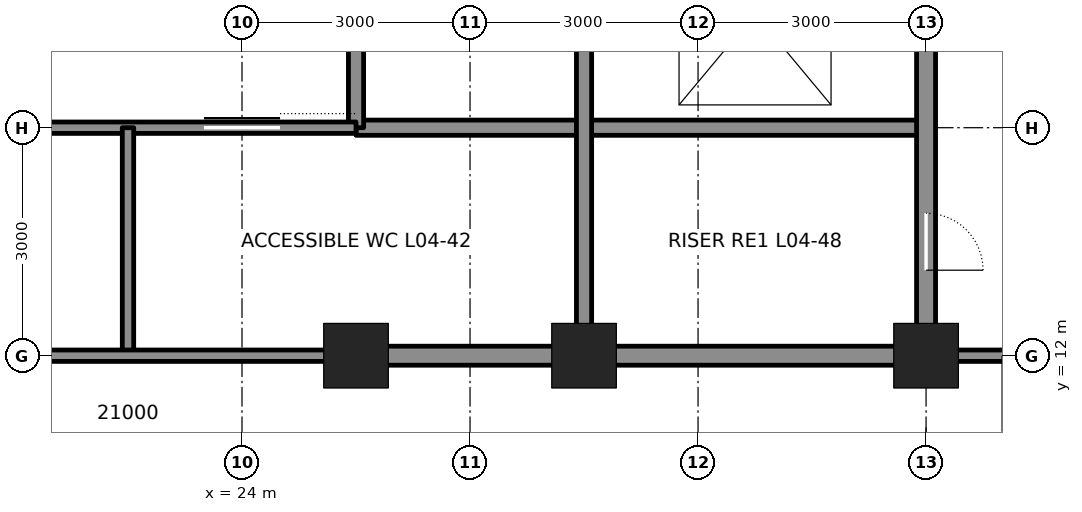
"""IFC4 building model, lengths in metres.
Left out: names, types, materials, properties, quantities, classifications, styles, units other than length and angle.
Written with IfcOpenShell. Run it as: python <this file> out.ifc"""

import sys

from ifc_helpers import new_model, si_unit, direction, frame, frame_2d, origin, origin_2d, place, context, subcontext, project, spatial, rectangle, hollow_rectangle, extrude, element, fill, save


model = new_model("IFC4")
c1 = context("Model", 3, precision=1e-05, world=origin(), true_north=direction((0.0, 1.0)))
c2 = subcontext(c1, "Body", "Model", "MODEL_VIEW")
j1 = project(units=[si_unit("LENGTHUNIT", "METRE"), si_unit("PLANEANGLEUNIT", "RADIAN")], contexts=[c1])
p1 = place(None, origin())
s1 = spatial("IfcSite", under=j1, at=p1, CompositionType="ELEMENT")
p2 = place(p1, origin())
s2 = spatial("IfcBuilding", under=s1, at=p2, CompositionType="ELEMENT")
p3 = place(p2, frame((0.0, 0.0, 24.3)))
s3 = spatial("IfcBuildingStorey", under=s2, at=p3, CompositionType="ELEMENT", Elevation=24.3)
for number, where, z_axis, x_axis in (
    (1, (25.5, 12.0, 0.0), (0.0, 0.0, 1.0), (1.0, 0.0, 0.0)),
    (2, (28.5, 12.0, 0.0), (0.0, 0.0, 1.0), (1.0, 0.0, 0.0)),
    (3, (33.0, 12.0, 0.0), (0.0, 0.0, 1.0), (1.0, 0.0, 0.0)),
):
    element("IfcColumn", number, at=place(p3, frame(where, z_axis=z_axis, x_axis=x_axis)), inside=s3, PredefinedType="COLUMN", context=c2, shape_type="SweptSolid", body=[
        extrude(hollow_rectangle(XDim=0.85, YDim=0.85, WallThickness=0.085, at=origin_2d()), origin(), (0.0, 0.0, 1.0), 4.5),
    ])
p4 = place(p3, frame((25.75, 12.0, 0.0), z_axis=(0.0, 0.0, 1.0), x_axis=(1.0, 0.0, 0.0)))
e4 = element("IfcWall", 4, at=p4, inside=s3, PredefinedType="SOLIDWALL", context=c2, shape_type="SweptSolid", body=[
    extrude(rectangle(XDim=2.5, YDim=0.25, at=frame_2d((1.25, 0.0))), origin(), (0.0, 0.0, 1.0), 3.181),
])
p5 = place(p3, frame((28.75, 12.0, 0.0), z_axis=(0.0, 0.0, 1.0), x_axis=(1.0, 0.0, 0.0)))
e5 = element("IfcWall", 5, at=p5, inside=s3, PredefinedType="SOLIDWALL", context=c2, shape_type="SweptSolid", body=[
    extrude(rectangle(XDim=4.0, YDim=0.25, at=frame_2d((2.0, 0.0))), origin(), (0.0, 0.0, 1.0), 3.181),
])
p6 = place(p3, frame((25.5, 15.0, 0.0), z_axis=(0.0, 0.0, 1.0), x_axis=(1.0, 0.0, 0.0)))
e6 = element("IfcWall", 6, at=p6, inside=s3, PredefinedType="SOLIDWALL", context=c2, shape_type="SweptSolid", body=[
    extrude(rectangle(XDim=7.5, YDim=0.2, at=frame_2d((3.75, 0.0))), origin(), (0.0, 0.0, 1.0), 4.34),
])
p7 = place(p3, frame((25.5, 15.0, 0.0), z_axis=(0.0, 0.0, 1.0), x_axis=(0.0, 1.0, 0.0)))
e7 = element("IfcWall", 7, at=p7, inside=s3, PredefinedType="SOLIDWALL", context=c2, shape_type="SweptSolid", body=[
    extrude(rectangle(XDim=12.0, YDim=0.2, at=frame_2d((6.0, 0.0))), origin(), (0.0, 0.0, 1.0), 3.365),
])
p8 = place(p3, frame((28.5, 12.25, 0.0), z_axis=(0.0, 0.0, 1.0), x_axis=(0.0, 1.0, 0.0)))
e8 = element("IfcWall", 8, at=p8, inside=s3, PredefinedType="SOLIDWALL", context=c2, shape_type="SweptSolid", body=[
    extrude(rectangle(XDim=8.5, YDim=0.2, at=frame_2d((4.25, 0.0))), origin(), (0.0, 0.0, 1.0), 3.413),
])
p9 = place(p3, frame((33.0, 12.25, 0.0), z_axis=(0.0, 0.0, 1.0), x_axis=(0.0, 1.0, 0.0)))
e9 = element("IfcWall", 9, at=p9, inside=s3, PredefinedType="SOLIDWALL", context=c2, shape_type="SweptSolid", body=[
    extrude(rectangle(XDim=8.5, YDim=0.25, at=frame_2d((4.25, 0.0))), origin(), (0.0, 0.0, 1.0), 3.113),
])
p10 = place(p9, frame((6.65, 0.0, 0.0)))
e10 = element("IfcOpeningElement", 10, at=p10, cuts=e9, PredefinedType="OPENING", context=c2, shape_type="SweptSolid", body=[
    extrude(rectangle(XDim=1.2, YDim=2.1, at=frame_2d((0.6, 1.05))), frame((0.0, 0.135, 0.0), z_axis=(0.0, -1.0, 0.0), x_axis=(1.0, 0.0, 0.0)), (0.0, 0.0, 1.0), 0.27),
])
p11 = place(p9, frame((0.875, 0.0, 0.0)))
e11 = element("IfcOpeningElement", 11, at=p11, cuts=e9, PredefinedType="OPENING", context=c2, shape_type="SweptSolid", body=[
    extrude(rectangle(XDim=0.75, YDim=2.1, at=frame_2d((0.375, 1.05))), frame((0.0, 0.135, 0.0), z_axis=(0.0, -1.0, 0.0), x_axis=(1.0, 0.0, 0.0)), (0.0, 0.0, 1.0), 0.27),
])
p12 = place(p3, frame((19.5, 15.0, 0.0), z_axis=(0.0, 0.0, 1.0), x_axis=(1.0, 0.0, 0.0)))
e12 = element("IfcWall", 12, at=p12, inside=s3, PredefinedType="PARTITIONING", context=c2, shape_type="SweptSolid", body=[
    extrude(rectangle(XDim=6.0, YDim=0.15, at=frame_2d((3.0, 0.0))), origin(), (0.0, 0.0, 1.0), 4.34),
])
p13 = place(p12, frame((4.0, 0.0, 0.0)))
e13 = element("IfcOpeningElement", 13, at=p13, cuts=e12, PredefinedType="OPENING", context=c2, shape_type="SweptSolid", body=[
    extrude(rectangle(XDim=1.0, YDim=2.1, at=frame_2d((0.5, 1.05))), frame((0.0, 0.085, 0.0), z_axis=(0.0, -1.0, 0.0), x_axis=(1.0, 0.0, 0.0)), (0.0, 0.0, 1.0), 0.17),
])
p14 = place(p12, frame((1.05, 0.0, 0.0)))
e14 = element("IfcOpeningElement", 14, at=p14, cuts=e12, PredefinedType="OPENING", context=c2, shape_type="SweptSolid", body=[
    extrude(rectangle(XDim=0.9, YDim=2.1, at=frame_2d((0.45, 1.05))), frame((0.0, 0.085, 0.0), z_axis=(0.0, -1.0, 0.0), x_axis=(1.0, 0.0, 0.0)), (0.0, 0.0, 1.0), 0.17),
])
p15 = place(p3, frame((22.5, 15.0, 0.0), z_axis=(0.0, 0.0, 1.0), x_axis=(0.0, -1.0, 0.0)))
e15 = element("IfcWall", 15, at=p15, inside=s3, PredefinedType="PARTITIONING", context=c2, shape_type="SweptSolid", body=[
    extrude(rectangle(XDim=3.0, YDim=0.15, at=frame_2d((1.5, 0.0))), origin(), (0.0, 0.0, 1.0), 4.34),
])
p16 = place(p3, frame((19.5, 12.0, 0.0), z_axis=(0.0, 0.0, 1.0), x_axis=(1.0, 0.0, 0.0)))
e16 = element("IfcWall", 16, at=p16, inside=s3, PredefinedType="PARTITIONING", context=c2, shape_type="SweptSolid", body=[
    extrude(rectangle(XDim=6.0, YDim=0.15, at=frame_2d((3.0, 0.0))), origin(), (0.0, 0.0, 1.0), 3.181),
])
p17 = place(p3, frame((33.0, 12.0, -0.3), z_axis=(0.0, 0.0, 1.0), x_axis=(1.0, 0.0, 0.0)))
e17 = element("IfcWall", 17, at=p17, inside=s3, PredefinedType="PARTITIONING", context=c2, shape_type="SweptSolid", body=[
    extrude(rectangle(XDim=3.0, YDim=0.15, at=frame_2d((1.5, 0.0))), origin(), (0.0, 0.0, 1.0), 3.481),
])
p18 = place(p17, frame((1.0, 0.0, 0.3)))
e18 = element("IfcOpeningElement", 18, at=p18, cuts=e17, PredefinedType="OPENING", context=c2, shape_type="SweptSolid", body=[
    extrude(rectangle(XDim=1.0, YDim=2.4, at=frame_2d((0.5, 1.2))), frame((0.0, 0.085, 0.0), z_axis=(0.0, -1.0, 0.0), x_axis=(1.0, 0.0, 0.0)), (0.0, 0.0, 1.0), 0.17),
])
p19 = place(p11, frame((0.75, 0.0, 0.0), z_axis=(0.0, 0.0, 1.0), x_axis=(-1.0, 0.0, 0.0)))
e19 = element("IfcDoor", 19, at=p19, inside=s3, OperationType="SINGLE_SWING_RIGHT", PredefinedType="DOOR", context=c2, shape_type="SweptSolid", body=[
    extrude(rectangle(XDim=0.75, YDim=2.1, at=frame_2d((0.375, 1.05))), frame((0.0, 0.025, 0.0), z_axis=(0.0, -1.0, 0.0), x_axis=(1.0, 0.0, 0.0)), (0.0, 0.0, 1.0), 0.05),
])
fill(e11, e19)
p20 = place(p13, origin())
e20 = element("IfcDoor", 20, at=p20, inside=s3, OperationType="SLIDING_TO_LEFT", PredefinedType="DOOR", context=c2, shape_type="SweptSolid", body=[
    extrude(rectangle(XDim=1.0, YDim=2.1, at=frame_2d((0.5, 1.05))), frame((0.0, 0.025, 0.0), z_axis=(0.0, -1.0, 0.0), x_axis=(1.0, 0.0, 0.0)), (0.0, 0.0, 1.0), 0.05),
])
fill(e13, e20)
save(model, sys.argv[1])
